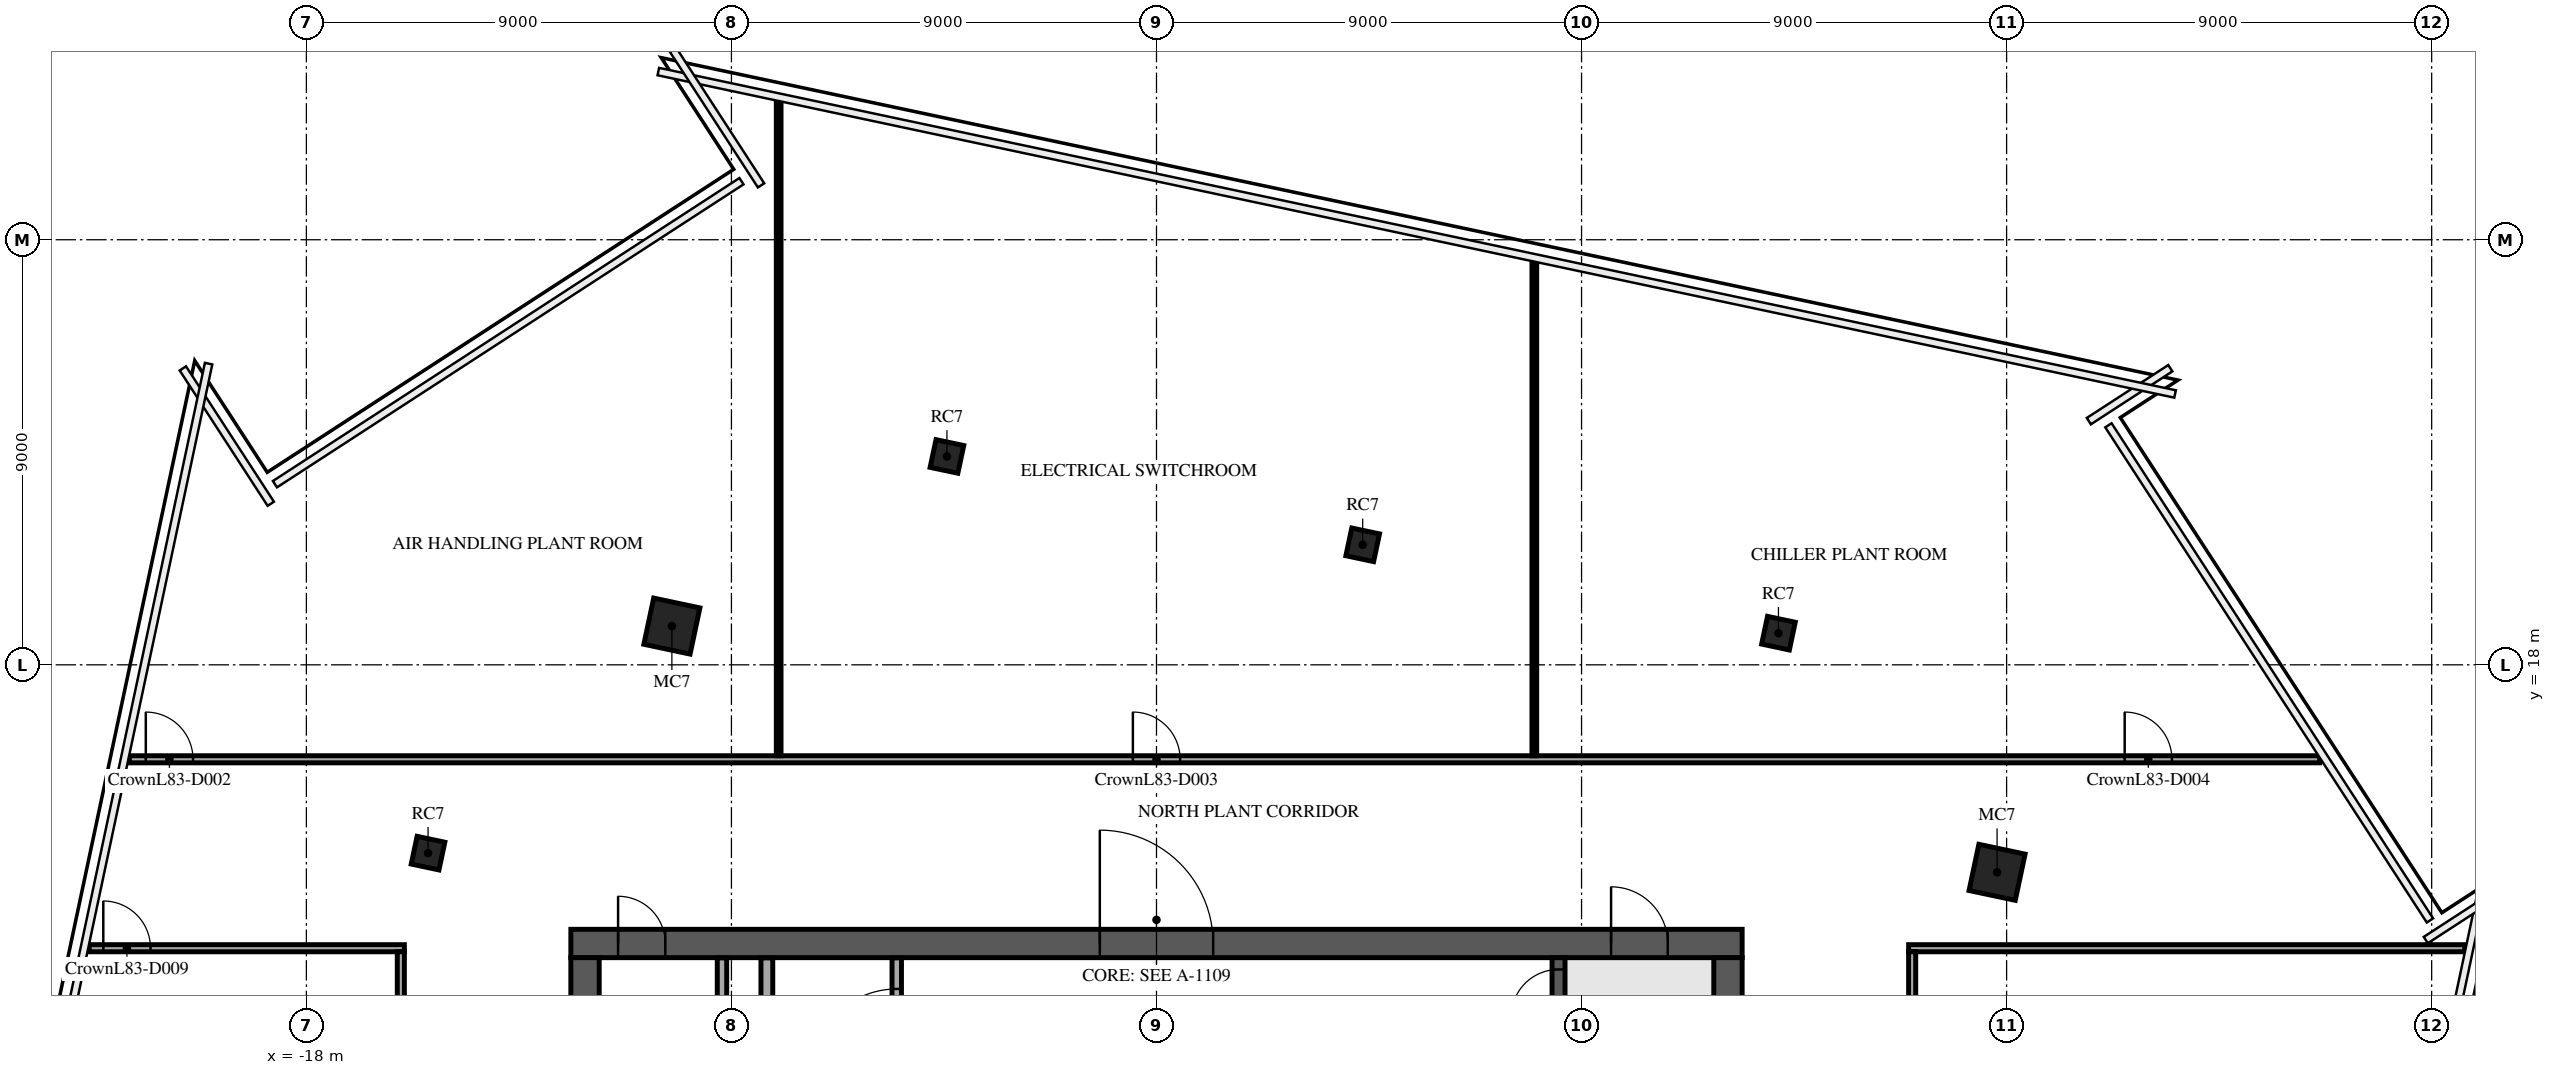
"""IFC4 building model, lengths in metres.
Left out: names, types, materials, properties, quantities, classifications, styles, units other than length and angle.
Written with IfcOpenShell. Run it as: python <this file> out.ifc"""

import sys

from ifc_helpers import new_model, si_unit, direction, frame, frame_2d, origin, origin_2d, place, context, subcontext, project, spatial, rectangle, extrude, element, fill, save


model = new_model("IFC4")
c1 = context("Model", 3, precision=1e-05, world=origin(), true_north=direction((0.0, 1.0)))
c2 = subcontext(c1, "Body", "Model", "MODEL_VIEW")
j1 = project(units=[si_unit("LENGTHUNIT", "METRE"), si_unit("PLANEANGLEUNIT", "RADIAN")], contexts=[c1])
p1 = place(None, origin())
s1 = spatial("IfcSite", under=j1, at=p1, CompositionType="ELEMENT")
p2 = place(p1, origin())
s2 = spatial("IfcBuilding", under=s1, at=p2, CompositionType="ELEMENT")
p3 = place(p2, frame((0.0, 0.0, 350.1)))
s3 = spatial("IfcBuildingStorey", under=s2, at=p3, CompositionType="ELEMENT", Elevation=350.1)
p4 = place(p3, frame((-10.261, 18.82, -0.3), z_axis=(0.0, 0.0, 1.0), x_axis=(0.207911690818, 0.978147600734, 0.0)))
e1 = element("IfcColumn", 1, at=p4, inside=s3, PredefinedType="COLUMN", context=c2, shape_type="SweptSolid", body=[
    extrude(rectangle(XDim=1.0, YDim=1.0, at=origin_2d()), origin(), (0.0, 0.0, 1.0), 8.3),
])
p5 = place(p3, frame((-15.424, 14.013, -0.3), z_axis=(0.0, 0.0, 1.0), x_axis=(0.207911690818, 0.978147600734, 0.0)))
e2 = element("IfcColumn", 2, at=p5, inside=s3, PredefinedType="COLUMN", context=c2, shape_type="SweptSolid", body=[
    extrude(rectangle(XDim=0.6, YDim=0.6, at=origin_2d()), origin(), (0.0, 0.0, 1.0), 8.3),
])
p6 = place(p3, frame((17.798, 13.607, -0.3), z_axis=(0.0, 0.0, 1.0), x_axis=(0.207911690818, 0.978147600734, 0.0)))
e3 = element("IfcColumn", 3, at=p6, inside=s3, PredefinedType="COLUMN", context=c2, shape_type="SweptSolid", body=[
    extrude(rectangle(XDim=1.0, YDim=1.0, at=origin_2d()), origin(), (0.0, 0.0, 1.0), 8.3),
])
for number, where, z_axis, x_axis in (
    (4, (13.169, 18.67, -0.3), (0.0, 0.0, 1.0), (0.208, 0.978, 0.0)),
    (5, (4.366, 20.541, -0.3), (0.0, 0.0, 1.0), (0.208, 0.978, 0.0)),
    (6, (-4.437, 22.412, -0.3), (0.0, 0.0, 1.0), (0.208, 0.978, 0.0)),
):
    element("IfcColumn", number, at=place(p3, frame(where, z_axis=z_axis, x_axis=x_axis)), inside=s3, PredefinedType="COLUMN", context=c2, shape_type="SweptSolid", body=[
        extrude(rectangle(XDim=0.6, YDim=0.6, at=origin_2d()), origin(), (0.0, 0.0, 1.0), 8.3),
    ])
p7 = place(p3, frame((-12.4, 12.1, 0.0), z_axis=(0.0, 0.0, 1.0), x_axis=(1.0, 0.0, 0.0)))
e7 = element("IfcWall", 7, at=p7, inside=s3, PredefinedType="SHEAR", context=c2, shape_type="SweptSolid", body=[
    extrude(rectangle(XDim=24.8, YDim=0.6, at=frame_2d((12.4, 0.0))), origin(), (0.0, 0.0, 1.0), 7.7),
])
p8 = place(p7, frame((11.2, 0.0, 0.0)))
e8 = element("IfcOpeningElement", 8, at=p8, cuts=e7, PredefinedType="OPENING", context=c2, shape_type="SweptSolid", body=[
    extrude(rectangle(XDim=2.4, YDim=2.4, at=frame_2d((1.2, 1.2))), frame((0.0, 0.31, 0.0), z_axis=(0.0, -1.0, 0.0), x_axis=(1.0, 0.0, 0.0)), (0.0, 0.0, 1.0), 0.62),
])
p9 = place(p7, frame((22.025, 0.0, 0.0)))
e9 = element("IfcOpeningElement", 9, at=p9, cuts=e7, PredefinedType="OPENING", context=c2, shape_type="SweptSolid", body=[
    extrude(rectangle(XDim=1.2, YDim=2.1, at=frame_2d((0.6, 1.05))), frame((0.0, 0.31, 0.0), z_axis=(0.0, -1.0, 0.0), x_axis=(1.0, 0.0, 0.0)), (0.0, 0.0, 1.0), 0.62),
])
p10 = place(p7, frame((1.0, 0.0, 0.0)))
e10 = element("IfcOpeningElement", 10, at=p10, cuts=e7, PredefinedType="OPENING", context=c2, shape_type="SweptSolid", body=[
    extrude(rectangle(XDim=1.0, YDim=2.1, at=frame_2d((0.5, 1.05))), frame((0.0, 0.31, 0.0), z_axis=(0.0, -1.0, 0.0), x_axis=(1.0, 0.0, 0.0)), (0.0, 0.0, 1.0), 0.62),
])
p11 = place(p3, frame((12.1, -11.8, 0.0), z_axis=(0.0, 0.0, 1.0), x_axis=(0.0, 1.0, 0.0)))
e11 = element("IfcWall", 11, at=p11, inside=s3, PredefinedType="SHEAR", context=c2, shape_type="SweptSolid", body=[
    extrude(rectangle(XDim=23.6, YDim=0.6, at=frame_2d((11.8, 0.0))), origin(), (0.0, 0.0, 1.0), 7.7),
])
p12 = place(p11, frame((10.6, 0.0, 0.0)))
e12 = element("IfcOpeningElement", 12, at=p12, cuts=e11, PredefinedType="OPENING", context=c2, shape_type="SweptSolid", body=[
    extrude(rectangle(XDim=2.4, YDim=2.4, at=frame_2d((1.2, 1.2))), frame((0.0, 0.31, 0.0), z_axis=(0.0, -1.0, 0.0), x_axis=(1.0, 0.0, 0.0)), (0.0, 0.0, 1.0), 0.62),
])
p13 = place(p3, frame((-12.1, -11.8, 0.0), z_axis=(0.0, 0.0, 1.0), x_axis=(0.0, 1.0, 0.0)))
e13 = element("IfcWall", 13, at=p13, inside=s3, PredefinedType="SHEAR", context=c2, shape_type="SweptSolid", body=[
    extrude(rectangle(XDim=23.6, YDim=0.6, at=frame_2d((11.8, 0.0))), origin(), (0.0, 0.0, 1.0), 7.7),
])
p14 = place(p13, frame((10.6, 0.0, 0.0)))
e14 = element("IfcOpeningElement", 14, at=p14, cuts=e13, PredefinedType="OPENING", context=c2, shape_type="SweptSolid", body=[
    extrude(rectangle(XDim=2.4, YDim=2.4, at=frame_2d((1.2, 1.2))), frame((0.0, 0.31, 0.0), z_axis=(0.0, -1.0, 0.0), x_axis=(1.0, 0.0, 0.0)), (0.0, 0.0, 1.0), 0.62),
])
p15 = place(p3, frame((8.512, 4.55, 0.0), z_axis=(0.0, 0.0, 1.0), x_axis=(0.0, 1.0, 0.0)))
e15 = element("IfcWall", 15, at=p15, inside=s3, PredefinedType="SOLIDWALL", context=c2, shape_type="SweptSolid", body=[
    extrude(rectangle(XDim=7.25, YDim=0.275, at=frame_2d((3.625, 0.0))), origin(), (0.0, 0.0, 1.0), 7.7),
])
p16 = place(p15, frame((6.0, 0.0, 0.0)))
e16 = element("IfcOpeningElement", 16, at=p16, cuts=e15, PredefinedType="OPENING", context=c2, shape_type="SweptSolid", body=[
    extrude(rectangle(XDim=1.0, YDim=2.1, at=frame_2d((0.5, 1.05))), frame((0.0, 0.147, 0.0), z_axis=(0.0, -1.0, 0.0), x_axis=(1.0, 0.0, 0.0)), (0.0, 0.0, 1.0), 0.295),
])
p17 = place(p3, frame((-9.2, 4.78, 0.0), z_axis=(0.0, 0.0, 1.0), x_axis=(0.0, 1.0, 0.0)))
e17 = element("IfcWall", 17, at=p17, inside=s3, PredefinedType="PARTITIONING", context=c2, shape_type="SweptSolid", body=[
    extrude(rectangle(XDim=7.015, YDim=0.2, at=frame_2d((3.507, 0.0))), origin(), (0.0, 0.0, 1.0), 7.7),
])
p18 = place(p17, frame((2.92, 0.0, 0.0)))
e18 = element("IfcOpeningElement", 18, at=p18, cuts=e17, PredefinedType="OPENING", context=c2, shape_type="SweptSolid", body=[
    extrude(rectangle(XDim=1.0, YDim=2.1, at=frame_2d((0.5, 1.05))), frame((0.0, 0.11, 0.0), z_axis=(0.0, -1.0, 0.0), x_axis=(1.0, 0.0, 0.0)), (0.0, 0.0, 1.0), 0.22),
])
p19 = place(p3, frame((-8.25, 8.805, 0.0), z_axis=(0.0, 0.0, 1.0), x_axis=(0.0, 1.0, 0.0)))
e19 = element("IfcWall", 19, at=p19, inside=s3, PredefinedType="PARTITIONING", context=c2, shape_type="SweptSolid", body=[
    extrude(rectangle(XDim=2.99, YDim=0.25, at=frame_2d((1.495, 0.0))), origin(), (0.0, 0.0, 1.0), 7.7),
])
p20 = place(p19, frame((0.895, 0.0, 0.0)))
e20 = element("IfcOpeningElement", 20, at=p20, cuts=e19, PredefinedType="OPENING", context=c2, shape_type="SweptSolid", body=[
    extrude(rectangle(XDim=1.0, YDim=2.1, at=frame_2d((0.5, 1.05))), frame((0.0, 0.135, 0.0), z_axis=(0.0, -1.0, 0.0), x_axis=(1.0, 0.0, 0.0)), (0.0, 0.0, 1.0), 0.27),
])
p21 = place(p3, frame((-5.5, 8.805, 0.0), z_axis=(0.0, 0.0, 1.0), x_axis=(0.0, 1.0, 0.0)))
e21 = element("IfcWall", 21, at=p21, inside=s3, PredefinedType="PARTITIONING", context=c2, shape_type="SweptSolid", body=[
    extrude(rectangle(XDim=2.99, YDim=0.2, at=frame_2d((1.495, 0.0))), origin(), (0.0, 0.0, 1.0), 7.7),
])
p22 = place(p21, frame((0.532, 0.0, 0.0)))
e22 = element("IfcOpeningElement", 22, at=p22, cuts=e21, PredefinedType="OPENING", context=c2, shape_type="SweptSolid", body=[
    extrude(rectangle(XDim=1.8, YDim=2.1, at=frame_2d((0.9, 1.05))), frame((0.0, 0.11, 0.0), z_axis=(0.0, -1.0, 0.0), x_axis=(1.0, 0.0, 0.0)), (0.0, 0.0, 1.0), 0.22),
])
p23 = place(p3, frame((-22.599, 12.0, 0.0), z_axis=(0.0, 0.0, 1.0), x_axis=(1.0, 0.0, 0.0)))
e23 = element("IfcWall", 23, at=p23, inside=s3, PredefinedType="PARTITIONING", context=c2, shape_type="SweptSolid", body=[
    extrude(rectangle(XDim=6.674, YDim=0.15, at=frame_2d((3.337, 0.0))), origin(), (0.0, 0.0, 1.0), 7.7),
])
p24 = place(p23, frame((0.299, 0.0, 0.0)))
e24 = element("IfcOpeningElement", 24, at=p24, cuts=e23, PredefinedType="OPENING", context=c2, shape_type="SweptSolid", body=[
    extrude(rectangle(XDim=1.0, YDim=2.1, at=frame_2d((0.5, 1.05))), frame((0.0, 0.085, 0.0), z_axis=(0.0, -1.0, 0.0), x_axis=(1.0, 0.0, 0.0)), (0.0, 0.0, 1.0), 0.17),
])
p25 = place(p3, frame((15.925, 12.0, 0.0), z_axis=(0.0, 0.0, 1.0), x_axis=(1.0, 0.0, 0.0)))
e25 = element("IfcWall", 25, at=p25, inside=s3, PredefinedType="PARTITIONING", context=c2, shape_type="SweptSolid", body=[
    extrude(rectangle(XDim=11.775, YDim=0.15, at=frame_2d((5.888, 0.0))), origin(), (0.0, 0.0, 1.0), 7.7),
])
p26 = place(p3, frame((-21.749, 16.0, 0.0), z_axis=(0.0, 0.0, 1.0), x_axis=(1.0, 0.0, 0.0)))
e26 = element("IfcWall", 26, at=p26, inside=s3, PredefinedType="PARTITIONING", context=c2, shape_type="SweptSolid", body=[
    extrude(rectangle(XDim=46.377, YDim=0.15, at=frame_2d((23.189, 0.0))), origin(), (0.0, 0.0, 1.0), 7.32),
])
p27 = place(p26, frame((0.349, 0.0, 0.0)))
e27 = element("IfcOpeningElement", 27, at=p27, cuts=e26, PredefinedType="OPENING", context=c2, shape_type="SweptSolid", body=[
    extrude(rectangle(XDim=1.0, YDim=2.1, at=frame_2d((0.5, 1.05))), frame((0.0, 0.085, 0.0), z_axis=(0.0, -1.0, 0.0), x_axis=(1.0, 0.0, 0.0)), (0.0, 0.0, 1.0), 0.17),
])
p28 = place(p26, frame((21.249, 0.0, 0.0)))
e28 = element("IfcOpeningElement", 28, at=p28, cuts=e26, PredefinedType="OPENING", context=c2, shape_type="SweptSolid", body=[
    extrude(rectangle(XDim=1.0, YDim=2.1, at=frame_2d((0.5, 1.05))), frame((0.0, 0.085, 0.0), z_axis=(0.0, -1.0, 0.0), x_axis=(1.0, 0.0, 0.0)), (0.0, 0.0, 1.0), 0.17),
])
p29 = place(p26, frame((42.249, 0.0, 0.0)))
e29 = element("IfcOpeningElement", 29, at=p29, cuts=e26, PredefinedType="OPENING", context=c2, shape_type="SweptSolid", body=[
    extrude(rectangle(XDim=1.0, YDim=2.1, at=frame_2d((0.5, 1.05))), frame((0.0, 0.085, 0.0), z_axis=(0.0, -1.0, 0.0), x_axis=(1.0, 0.0, 0.0)), (0.0, 0.0, 1.0), 0.17),
])
p30 = place(p3, frame((-16.0, 0.05, 0.0), z_axis=(0.0, 0.0, 1.0), x_axis=(0.0, 1.0, 0.0)))
e30 = element("IfcWall", 30, at=p30, inside=s3, PredefinedType="PARTITIONING", context=c2, shape_type="SweptSolid", body=[
    extrude(rectangle(XDim=11.875, YDim=0.15, at=frame_2d((5.938, 0.0))), origin(), (0.0, 0.0, 1.0), 7.32),
])
p31 = place(p3, frame((-8.0, 16.075, 0.0), z_axis=(0.0, 0.0, 1.0), x_axis=(0.0, 1.0, 0.0)))
e31 = element("IfcWall", 31, at=p31, inside=s3, PredefinedType="PARTITIONING", context=c2, shape_type="SweptSolid", body=[
    extrude(rectangle(XDim=13.842, YDim=0.1, at=frame_2d((6.921, 0.0))), origin(), (0.0, 0.0, 1.0), 7.7),
])
p32 = place(p3, frame((8.0, 16.075, 0.0), z_axis=(0.0, 0.0, 1.0), x_axis=(0.0, 1.0, 0.0)))
e32 = element("IfcWall", 32, at=p32, inside=s3, PredefinedType="PARTITIONING", context=c2, shape_type="SweptSolid", body=[
    extrude(rectangle(XDim=10.441, YDim=0.1, at=frame_2d((5.221, 0.0))), origin(), (0.0, 0.0, 1.0), 7.7),
])
p33 = place(p3, frame((16.0, -11.925, 0.0), z_axis=(0.0, 0.0, 1.0), x_axis=(0.0, 1.0, 0.0)))
e33 = element("IfcWall", 33, at=p33, inside=s3, PredefinedType="PARTITIONING", context=c2, shape_type="SweptSolid", body=[
    extrude(rectangle(XDim=23.85, YDim=0.15, at=frame_2d((11.925, 0.0))), origin(), (0.0, 0.0, 1.0), 7.32),
])
p34 = place(p33, frame((11.025, 0.0, 0.0)))
e34 = element("IfcOpeningElement", 34, at=p34, cuts=e33, PredefinedType="OPENING", context=c2, shape_type="SweptSolid", body=[
    extrude(rectangle(XDim=1.8, YDim=2.1, at=frame_2d((0.9, 1.05))), frame((0.0, 0.085, 0.0), z_axis=(0.0, -1.0, 0.0), x_axis=(1.0, 0.0, 0.0)), (0.0, 0.0, 1.0), 0.17),
])
p35 = place(p8, origin())
e35 = element("IfcDoor", 35, at=p35, inside=s3, OperationType="SINGLE_SWING_LEFT", PredefinedType="DOOR", context=c2, shape_type="SweptSolid", body=[
    extrude(rectangle(XDim=2.4, YDim=2.4, at=frame_2d((1.2, 1.2))), frame((0.0, 0.025, 0.0), z_axis=(0.0, -1.0, 0.0), x_axis=(1.0, 0.0, 0.0)), (0.0, 0.0, 1.0), 0.05),
])
fill(e8, e35)
p36 = place(p9, origin())
e36 = element("IfcDoor", 36, at=p36, inside=s3, OperationType="SINGLE_SWING_LEFT", PredefinedType="DOOR", context=c2, shape_type="SweptSolid", body=[
    extrude(rectangle(XDim=1.2, YDim=2.1, at=frame_2d((0.6, 1.05))), frame((0.0, 0.025, 0.0), z_axis=(0.0, -1.0, 0.0), x_axis=(1.0, 0.0, 0.0)), (0.0, 0.0, 1.0), 0.05),
])
fill(e9, e36)
p37 = place(p10, origin())
e37 = element("IfcDoor", 37, at=p37, inside=s3, OperationType="SINGLE_SWING_LEFT", PredefinedType="DOOR", context=c2, shape_type="SweptSolid", body=[
    extrude(rectangle(XDim=1.0, YDim=2.1, at=frame_2d((0.5, 1.05))), frame((0.0, 0.025, 0.0), z_axis=(0.0, -1.0, 0.0), x_axis=(1.0, 0.0, 0.0)), (0.0, 0.0, 1.0), 0.05),
])
fill(e10, e37)
p38 = place(p16, origin())
e38 = element("IfcDoor", 38, at=p38, inside=s3, OperationType="SINGLE_SWING_LEFT", PredefinedType="DOOR", context=c2, shape_type="SweptSolid", body=[
    extrude(rectangle(XDim=1.0, YDim=2.1, at=frame_2d((0.5, 1.05))), frame((0.0, 0.025, 0.0), z_axis=(0.0, -1.0, 0.0), x_axis=(1.0, 0.0, 0.0)), (0.0, 0.0, 1.0), 0.05),
])
fill(e16, e38)
p39 = place(p22, origin())
e39 = element("IfcDoor", 39, at=p39, inside=s3, OperationType="SINGLE_SWING_LEFT", PredefinedType="DOOR", context=c2, shape_type="SweptSolid", body=[
    extrude(rectangle(XDim=1.8, YDim=2.1, at=frame_2d((0.9, 1.05))), frame((0.0, 0.025, 0.0), z_axis=(0.0, -1.0, 0.0), x_axis=(1.0, 0.0, 0.0)), (0.0, 0.0, 1.0), 0.05),
])
fill(e22, e39)
p40 = place(p27, origin())
e40 = element("IfcDoor", 40, at=p40, inside=s3, OperationType="SINGLE_SWING_RIGHT", PredefinedType="DOOR", context=c2, shape_type="SweptSolid", body=[
    extrude(rectangle(XDim=1.0, YDim=2.1, at=frame_2d((0.5, 1.05))), frame((0.0, 0.025, 0.0), z_axis=(0.0, -1.0, 0.0), x_axis=(1.0, 0.0, 0.0)), (0.0, 0.0, 1.0), 0.05),
])
fill(e27, e40)
p41 = place(p28, origin())
e41 = element("IfcDoor", 41, at=p41, inside=s3, OperationType="SINGLE_SWING_LEFT", PredefinedType="DOOR", context=c2, shape_type="SweptSolid", body=[
    extrude(rectangle(XDim=1.0, YDim=2.1, at=frame_2d((0.5, 1.05))), frame((0.0, 0.025, 0.0), z_axis=(0.0, -1.0, 0.0), x_axis=(1.0, 0.0, 0.0)), (0.0, 0.0, 1.0), 0.05),
])
fill(e28, e41)
p42 = place(p29, origin())
e42 = element("IfcDoor", 42, at=p42, inside=s3, OperationType="SINGLE_SWING_RIGHT", PredefinedType="DOOR", context=c2, shape_type="SweptSolid", body=[
    extrude(rectangle(XDim=1.0, YDim=2.1, at=frame_2d((0.5, 1.05))), frame((0.0, 0.025, 0.0), z_axis=(0.0, -1.0, 0.0), x_axis=(1.0, 0.0, 0.0)), (0.0, 0.0, 1.0), 0.05),
])
fill(e29, e42)
p43 = place(p24, origin())
e43 = element("IfcDoor", 43, at=p43, inside=s3, OperationType="SINGLE_SWING_LEFT", PredefinedType="DOOR", context=c2, shape_type="SweptSolid", body=[
    extrude(rectangle(XDim=1.0, YDim=2.1, at=frame_2d((0.5, 1.05))), frame((0.0, 0.025, 0.0), z_axis=(0.0, -1.0, 0.0), x_axis=(1.0, 0.0, 0.0)), (0.0, 0.0, 1.0), 0.05),
])
fill(e24, e43)
save(model, sys.argv[1])
